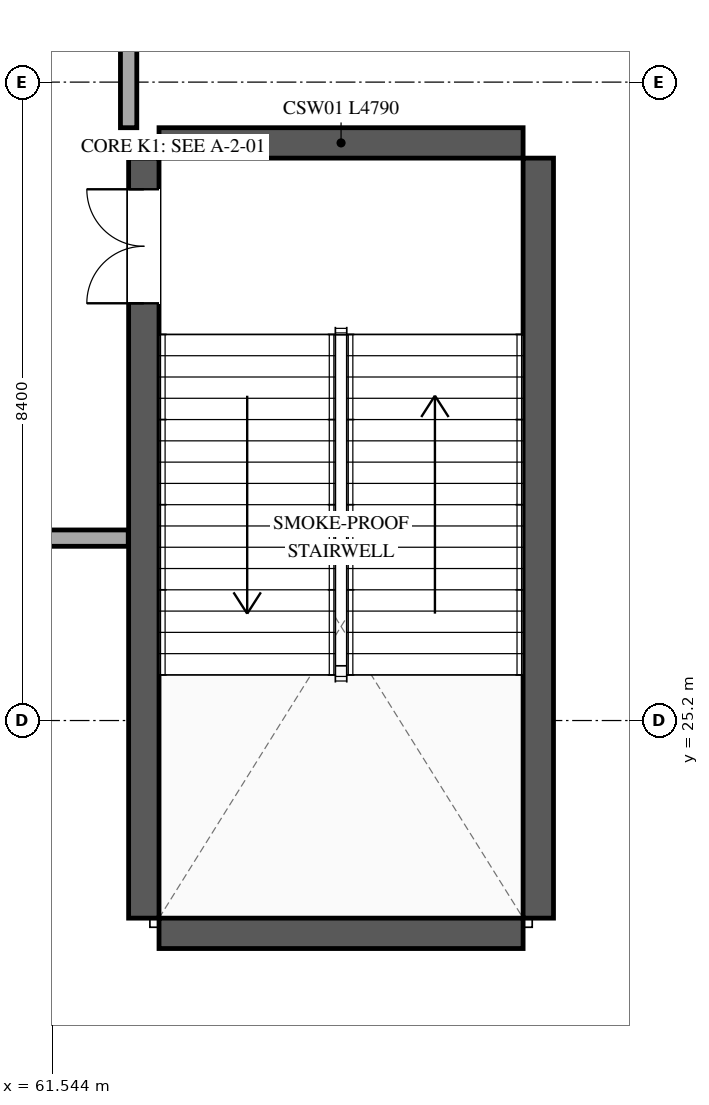
"""IFC4 building model, lengths in metres.
Left out: names, types, materials, properties, quantities, classifications, styles, units other than length and angle.
Written with IfcOpenShell. Run it as: python <this file> out.ifc"""

import sys

from ifc_helpers import new_model, si_unit, direction, frame, frame_2d, origin, place, context, subcontext, project, spatial, rectangle, extrude, element, fill, save


model = new_model("IFC4")
c1 = context("Model", 3, precision=1e-05, world=origin(), true_north=direction((0.0, 1.0)))
c2 = subcontext(c1, "Body", "Model", "MODEL_VIEW")
j1 = project(units=[si_unit("LENGTHUNIT", "METRE"), si_unit("PLANEANGLEUNIT", "RADIAN")], contexts=[c1])
p1 = place(None, origin())
s1 = spatial("IfcSite", under=j1, at=p1, CompositionType="ELEMENT")
p2 = place(p1, origin())
s2 = spatial("IfcBuilding", under=s1, at=p2, CompositionType="ELEMENT")
p3 = place(p2, frame((0.0, 0.0, 21.6)))
s3 = spatial("IfcBuildingStorey", under=s2, at=p3, CompositionType="ELEMENT", Elevation=21.6)
p4 = place(p3, frame((62.75, 22.6, 0.0), z_axis=(0.0, 0.0, 1.0), x_axis=(0.0, 1.0, 0.0)))
e1 = element("IfcWall", 1, at=p4, inside=s3, PredefinedType="SHEAR", context=c2, shape_type="SweptSolid", body=[
    extrude(rectangle(XDim=10.0, YDim=0.4, at=frame_2d((5.0, 0.0))), origin(), (0.0, 0.0, 1.0), 5.1),
])
p5 = place(p4, frame((8.09, 0.0, 0.0)))
e2 = element("IfcOpeningElement", 2, at=p5, cuts=e1, PredefinedType="OPENING", context=c2, shape_type="SweptSolid", body=[
    extrude(rectangle(XDim=1.5, YDim=2.2, at=frame_2d((0.75, 1.1))), frame((0.0, 0.21, 0.0), z_axis=(0.0, -1.0, 0.0), x_axis=(1.0, 0.0, 0.0)), (0.0, 0.0, 1.0), 0.42),
])
p6 = place(p3, frame((67.94, 32.6, 0.0), z_axis=(0.0, 0.0, 1.0), x_axis=(0.0, -1.0, 0.0)))
e3 = element("IfcWall", 3, at=p6, inside=s3, PredefinedType="SHEAR", context=c2, shape_type="SweptSolid", body=[
    extrude(rectangle(XDim=10.0, YDim=0.4, at=frame_2d((5.0, 0.0))), origin(), (0.0, 0.0, 1.0), 5.1),
])
for number, where, z_axis, x_axis in (
    (4, (67.74, 22.4, 0.0), (0.0, 0.0, 1.0), (-1.0, 0.0, 0.0)),
    (5, (62.95, 32.8, 0.0), (0.0, 0.0, 1.0), (1.0, 0.0, 0.0)),
):
    element("IfcWall", number, at=place(p3, frame(where, z_axis=z_axis, x_axis=x_axis)), inside=s3, PredefinedType="SHEAR", context=c2, shape_type="SweptSolid", body=[
        extrude(rectangle(XDim=4.79, YDim=0.4, at=frame_2d((2.395, 0.0))), origin(), (0.0, 0.0, 1.0), 5.1),
    ])
p7 = place(p3, frame((62.545, 27.6, 0.0), z_axis=(0.0, 0.0, 1.0), x_axis=(-1.0, 0.0, 0.0)))
e6 = element("IfcWall", 6, at=p7, inside=s3, PredefinedType="PARTITIONING", context=c2, shape_type="SweptSolid", body=[
    extrude(rectangle(XDim=5.745, YDim=0.215, at=frame_2d((2.873, 0.0))), origin(), (0.0, 0.0, 1.0), 4.06),
])
p8 = place(p3, frame((62.55, 35.0, 0.0), z_axis=(0.0, 0.0, 1.0), x_axis=(0.0, -1.0, 0.0)))
e7 = element("IfcWall", 7, at=p8, inside=s3, PredefinedType="PARTITIONING", context=c2, shape_type="SweptSolid", body=[
    extrude(rectangle(XDim=2.0, YDim=0.215, at=frame_2d((1.0, 0.0))), origin(), (0.0, 0.0, 1.0), 4.06),
])
p9 = place(p5, origin())
e8 = element("IfcDoor", 8, at=p9, inside=s3, OperationType="DOUBLE_DOOR_SINGLE_SWING", PredefinedType="DOOR", context=c2, shape_type="SweptSolid", body=[
    extrude(rectangle(XDim=1.5, YDim=2.2, at=frame_2d((0.75, 1.1))), frame((0.0, 0.025, 0.0), z_axis=(0.0, -1.0, 0.0), x_axis=(1.0, 0.0, 0.0)), (0.0, 0.0, 1.0), 0.05),
])
fill(e2, e8)
save(model, sys.argv[1])
